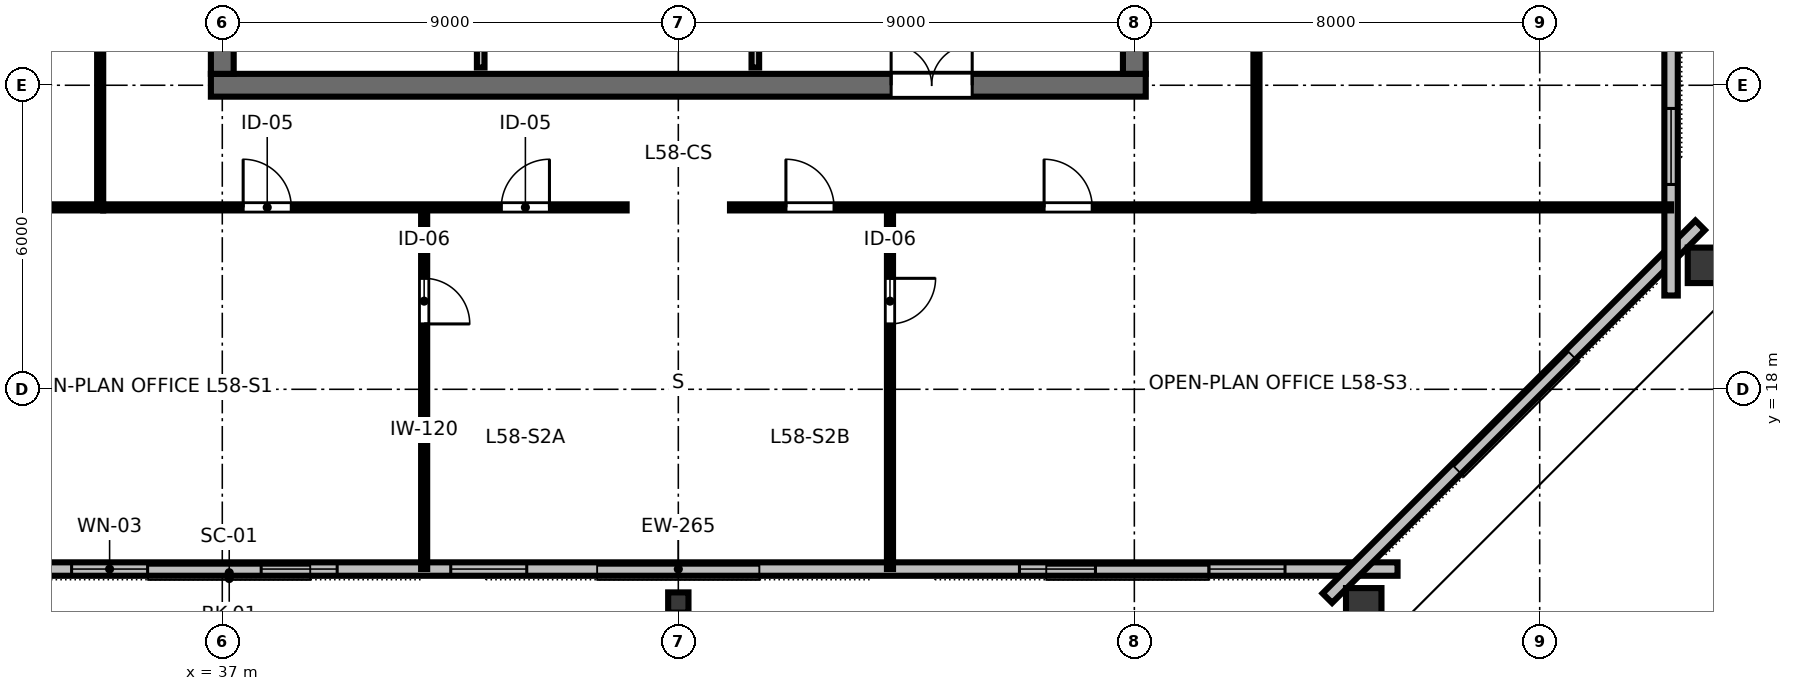
"""IFC4 building model, lengths in metres.
Left out: names, types, materials, properties, quantities, classifications, styles, units other than length and angle.
Written with IfcOpenShell. Run it as: python <this file> out.ifc"""

import sys

from ifc_helpers import new_model, si_unit, direction, frame, frame_2d, origin, origin_2d, place, context, subcontext, project, spatial, rectangle, hollow_rectangle, i_section, extrude, element, fill, save


model = new_model("IFC4")
c1 = context("Model", 3, precision=1e-05, world=origin(), true_north=direction((0.0, 1.0)))
c2 = subcontext(c1, "Body", "Model", "MODEL_VIEW")
j1 = project(units=[si_unit("LENGTHUNIT", "METRE"), si_unit("PLANEANGLEUNIT", "RADIAN")], contexts=[c1])
p1 = place(None, origin())
s1 = spatial("IfcSite", under=j1, at=p1, CompositionType="ELEMENT")
p2 = place(p1, origin())
s2 = spatial("IfcBuilding", under=s1, at=p2, CompositionType="ELEMENT")
p3 = place(p2, frame((0.0, 0.0, 220.2)))
s3 = spatial("IfcBuildingStorey", under=s2, at=p3, CompositionType="ELEMENT", Elevation=220.2)
p4 = place(p3, frame((36.775, 24.0, 0.0), z_axis=(0.0, 0.0, 1.0), x_axis=(1.0, 0.0, 0.0)))
e1 = element("IfcWall", 1, at=p4, inside=s3, PredefinedType="SHEAR", context=c2, shape_type="SweptSolid", body=[
    extrude(rectangle(XDim=18.45, YDim=0.45, at=frame_2d((9.225, 0.0))), origin(), (0.0, 0.0, 1.0), 3.36),
])
p5 = place(p4, frame((13.425, 0.0, 0.0)))
e2 = element("IfcOpeningElement", 2, at=p5, cuts=e1, PredefinedType="OPENING", context=c2, shape_type="SweptSolid", body=[
    extrude(rectangle(XDim=1.6, YDim=2.15, at=frame_2d((0.8, 1.075))), frame((0.0, 0.235, 0.0), z_axis=(0.0, -1.0, 0.0), x_axis=(1.0, 0.0, 0.0)), (0.0, 0.0, 1.0), 0.47),
])
p6 = place(p3, frame((37.0, 24.225, 0.0), z_axis=(0.0, 0.0, 1.0), x_axis=(0.0, 1.0, 0.0)))
e3 = element("IfcWall", 3, at=p6, inside=s3, PredefinedType="SHEAR", context=c2, shape_type="SweptSolid", body=[
    extrude(rectangle(XDim=15.55, YDim=0.45, at=frame_2d((7.775, 0.0))), origin(), (0.0, 0.0, 1.0), 3.36),
])
p7 = place(p6, frame((5.3, 0.0, 0.0)))
e4 = element("IfcOpeningElement", 4, at=p7, cuts=e3, PredefinedType="OPENING", context=c2, shape_type="SweptSolid", body=[
    extrude(rectangle(XDim=1.15, YDim=2.15, at=frame_2d((0.575, 1.075))), frame((0.0, 0.235, 0.0), z_axis=(0.0, -1.0, 0.0), x_axis=(1.0, 0.0, 0.0)), (0.0, 0.0, 1.0), 0.47),
])
p8 = place(p3, frame((55.0, 24.225, 0.0), z_axis=(0.0, 0.0, 1.0), x_axis=(0.0, 1.0, 0.0)))
e5 = element("IfcWall", 5, at=p8, inside=s3, PredefinedType="SHEAR", context=c2, shape_type="SweptSolid", body=[
    extrude(rectangle(XDim=15.55, YDim=0.45, at=frame_2d((7.775, 0.0))), origin(), (0.0, 0.0, 1.0), 3.36),
])
p9 = place(p8, frame((5.3, 0.0, 0.0)))
e6 = element("IfcOpeningElement", 6, at=p9, cuts=e5, PredefinedType="OPENING", context=c2, shape_type="SweptSolid", body=[
    extrude(rectangle(XDim=1.15, YDim=2.15, at=frame_2d((0.575, 1.075))), frame((0.0, 0.235, 0.0), z_axis=(0.0, -1.0, 0.0), x_axis=(1.0, 0.0, 0.0)), (0.0, 0.0, 1.0), 0.47),
])
p10 = place(p3, frame((46.0, 13.793, 0.0), z_axis=(0.0, 0.0, 1.0), x_axis=(1.0, 0.0, 0.0)))
e7 = element("IfcColumn", 7, at=p10, inside=s3, PredefinedType="COLUMN", context=c2, shape_type="SweptSolid", body=[
    extrude(i_section(OverallWidth=0.401, OverallDepth=0.399, WebThickness=0.025, FlangeThickness=0.04, FilletRadius=0.025, at=origin_2d()), origin(), (0.0, 0.0, 1.0), 3.373),
])
for number, where, z_axis, x_axis in (
    (8, (59.527, 13.652, 0.0), (0.0, 0.0, 1.0), (1.0, 0.0, 0.0)),
    (9, (66.347, 20.446, 0.0), (0.0, 0.0, 1.0), (0.0, 1.0, 0.0)),
):
    element("IfcColumn", number, at=place(p3, frame(where, z_axis=z_axis, x_axis=x_axis)), inside=s3, PredefinedType="COLUMN", context=c2, shape_type="SweptSolid", body=[
        extrude(hollow_rectangle(XDim=0.7, YDim=0.85, WallThickness=0.04, at=origin_2d()), origin(), (0.0, 0.0, 1.0), 3.373),
    ])
p11 = place(p3, frame((31.805, 14.453, 0.0), z_axis=(0.0, 0.0, 1.0), x_axis=(1.0, 0.0, 0.0)))
e10 = element("IfcWall", 10, at=p11, inside=s3, PredefinedType="STANDARD", context=c2, shape_type="SweptSolid", body=[
    extrude(rectangle(XDim=28.389, YDim=0.265, at=frame_2d((14.195, 0.0))), origin(), (0.0, 0.0, 1.0), 3.375),
])
p12 = place(p11, frame((2.221, 0.0, 0.85)))
e11 = element("IfcOpeningElement", 11, at=p12, cuts=e10, PredefinedType="OPENING", context=c2, shape_type="SweptSolid", body=[
    extrude(rectangle(XDim=1.5, YDim=1.85, at=frame_2d((0.75, 0.925))), frame((0.0, 0.142, 0.0), z_axis=(0.0, -1.0, 0.0), x_axis=(1.0, 0.0, 0.0)), (0.0, 0.0, 1.0), 0.285),
])
p13 = place(p11, frame((5.962, 0.0, 0.85)))
e12 = element("IfcOpeningElement", 12, at=p13, cuts=e10, PredefinedType="OPENING", context=c2, shape_type="SweptSolid", body=[
    extrude(rectangle(XDim=1.5, YDim=1.85, at=frame_2d((0.75, 0.925))), frame((0.0, 0.142, 0.0), z_axis=(0.0, -1.0, 0.0), x_axis=(1.0, 0.0, 0.0)), (0.0, 0.0, 1.0), 0.285),
])
p14 = place(p11, frame((9.703, 0.0, 0.85)))
e13 = element("IfcOpeningElement", 13, at=p14, cuts=e10, PredefinedType="OPENING", context=c2, shape_type="SweptSolid", body=[
    extrude(rectangle(XDim=1.5, YDim=1.85, at=frame_2d((0.75, 0.925))), frame((0.0, 0.142, 0.0), z_axis=(0.0, -1.0, 0.0), x_axis=(1.0, 0.0, 0.0)), (0.0, 0.0, 1.0), 0.285),
])
p15 = place(p11, frame((20.927, 0.0, 0.85)))
e14 = element("IfcOpeningElement", 14, at=p15, cuts=e10, PredefinedType="OPENING", context=c2, shape_type="SweptSolid", body=[
    extrude(rectangle(XDim=1.5, YDim=1.85, at=frame_2d((0.75, 0.925))), frame((0.0, 0.142, 0.0), z_axis=(0.0, -1.0, 0.0), x_axis=(1.0, 0.0, 0.0)), (0.0, 0.0, 1.0), 0.285),
])
p16 = place(p11, frame((24.668, 0.0, 0.85)))
e15 = element("IfcOpeningElement", 15, at=p16, cuts=e10, PredefinedType="OPENING", context=c2, shape_type="SweptSolid", body=[
    extrude(rectangle(XDim=1.5, YDim=1.85, at=frame_2d((0.75, 0.925))), frame((0.0, 0.142, 0.0), z_axis=(0.0, -1.0, 0.0), x_axis=(1.0, 0.0, 0.0)), (0.0, 0.0, 1.0), 0.285),
])
p17 = place(p3, frame((58.809, 13.879, 0.0), z_axis=(0.0, 0.0, 1.0), x_axis=(0.707106781187, 0.707106781187, 0.0)))
e16 = element("IfcWall", 16, at=p17, inside=s3, PredefinedType="STANDARD", context=c2, shape_type="SweptSolid", body=[
    extrude(rectangle(XDim=10.405, YDim=0.265, at=frame_2d((5.203, 0.0))), origin(), (0.0, 0.0, 1.0), 3.375),
])
p18 = place(p3, frame((65.593, 19.851, 0.0), z_axis=(0.0, 0.0, 1.0), x_axis=(0.0, 1.0, 0.0)))
e17 = element("IfcWall", 17, at=p18, inside=s3, PredefinedType="STANDARD", context=c2, shape_type="SweptSolid", body=[
    extrude(rectangle(XDim=24.298, YDim=0.265, at=frame_2d((12.149, 0.0))), origin(), (0.0, 0.0, 1.0), 3.375),
])
p19 = place(p18, frame((13.499, 0.0, 0.0)))
e18 = element("IfcOpeningElement", 18, at=p19, cuts=e17, PredefinedType="OPENING", context=c2, shape_type="SweptSolid", body=[
    extrude(rectangle(XDim=1.4, YDim=2.15, at=frame_2d((0.7, 1.075))), frame((0.0, 0.142, 0.0), z_axis=(0.0, -1.0, 0.0), x_axis=(1.0, 0.0, 0.0)), (0.0, 0.0, 1.0), 0.285),
])
p20 = place(p18, frame((2.191, 0.0, 0.85)))
e19 = element("IfcOpeningElement", 19, at=p20, cuts=e17, PredefinedType="OPENING", context=c2, shape_type="SweptSolid", body=[
    extrude(rectangle(XDim=1.5, YDim=1.85, at=frame_2d((0.75, 0.925))), frame((0.0, 0.142, 0.0), z_axis=(0.0, -1.0, 0.0), x_axis=(1.0, 0.0, 0.0)), (0.0, 0.0, 1.0), 0.285),
])
p21 = place(p18, frame((5.875, 0.0, 0.85)))
e20 = element("IfcOpeningElement", 20, at=p21, cuts=e17, PredefinedType="OPENING", context=c2, shape_type="SweptSolid", body=[
    extrude(rectangle(XDim=1.5, YDim=1.85, at=frame_2d((0.75, 0.925))), frame((0.0, 0.142, 0.0), z_axis=(0.0, -1.0, 0.0), x_axis=(1.0, 0.0, 0.0)), (0.0, 0.0, 1.0), 0.285),
])
p22 = place(p18, frame((9.558, 0.0, 0.85)))
e21 = element("IfcOpeningElement", 21, at=p22, cuts=e17, PredefinedType="OPENING", context=c2, shape_type="SweptSolid", body=[
    extrude(rectangle(XDim=1.5, YDim=1.85, at=frame_2d((0.75, 0.925))), frame((0.0, 0.142, 0.0), z_axis=(0.0, -1.0, 0.0), x_axis=(1.0, 0.0, 0.0)), (0.0, 0.0, 1.0), 0.285),
])
p23 = place(p18, frame((16.924, 0.0, 0.85)))
e22 = element("IfcOpeningElement", 22, at=p23, cuts=e17, PredefinedType="OPENING", context=c2, shape_type="SweptSolid", body=[
    extrude(rectangle(XDim=1.5, YDim=1.85, at=frame_2d((0.75, 0.925))), frame((0.0, 0.142, 0.0), z_axis=(0.0, -1.0, 0.0), x_axis=(1.0, 0.0, 0.0)), (0.0, 0.0, 1.0), 0.285),
])
p24 = place(p18, frame((20.607, 0.0, 0.85)))
e23 = element("IfcOpeningElement", 23, at=p24, cuts=e17, PredefinedType="OPENING", context=c2, shape_type="SweptSolid", body=[
    extrude(rectangle(XDim=1.5, YDim=1.85, at=frame_2d((0.75, 0.925))), frame((0.0, 0.142, 0.0), z_axis=(0.0, -1.0, 0.0), x_axis=(1.0, 0.0, 0.0)), (0.0, 0.0, 1.0), 0.285),
])
p25 = place(p3, frame((42.1, 24.35, 0.0), z_axis=(0.0, 0.0, 1.0), x_axis=(0.0, 1.0, 0.0)))
e24 = element("IfcWall", 24, at=p25, inside=s3, PredefinedType="PARTITIONING", context=c2, shape_type="SweptSolid", body=[
    extrude(rectangle(XDim=3.9, YDim=0.15, at=frame_2d((1.95, 0.0))), origin(), (0.0, 0.0, 1.0), 3.375),
])
p26 = place(p25, frame((1.5, 0.0, 0.0)))
e25 = element("IfcOpeningElement", 25, at=p26, cuts=e24, PredefinedType="OPENING", context=c2, shape_type="SweptSolid", body=[
    extrude(rectangle(XDim=0.9, YDim=2.15, at=frame_2d((0.45, 1.075))), frame((0.0, 0.085, 0.0), z_axis=(0.0, -1.0, 0.0), x_axis=(1.0, 0.0, 0.0)), (0.0, 0.0, 1.0), 0.17),
])
p27 = place(p3, frame((47.52, 24.35, 0.0), z_axis=(0.0, 0.0, 1.0), x_axis=(0.0, 1.0, 0.0)))
e26 = element("IfcWall", 26, at=p27, inside=s3, PredefinedType="PARTITIONING", context=c2, shape_type="SweptSolid", body=[
    extrude(rectangle(XDim=3.9, YDim=0.15, at=frame_2d((1.95, 0.0))), origin(), (0.0, 0.0, 1.0), 3.375),
])
p28 = place(p27, frame((0.35, 0.0, 0.0)))
e27 = element("IfcOpeningElement", 27, at=p28, cuts=e26, PredefinedType="OPENING", context=c2, shape_type="SweptSolid", body=[
    extrude(rectangle(XDim=0.9, YDim=2.15, at=frame_2d((0.45, 1.075))), frame((0.0, 0.085, 0.0), z_axis=(0.0, -1.0, 0.0), x_axis=(1.0, 0.0, 0.0)), (0.0, 0.0, 1.0), 0.17),
])
p29 = place(p3, frame((40.984, 21.59, 0.0), z_axis=(0.0, 0.0, 1.0), x_axis=(0.0, -1.0, 0.0)))
e28 = element("IfcWall", 28, at=p29, inside=s3, PredefinedType="PARTITIONING", context=c2, shape_type="SweptSolid", body=[
    extrude(rectangle(XDim=7.137, YDim=0.12, at=frame_2d((3.569, 0.0))), origin(), (0.0, 0.0, 1.0), 2.655),
])
p30 = place(p29, frame((1.4, 0.0, 0.0)))
e29 = element("IfcOpeningElement", 29, at=p30, cuts=e28, PredefinedType="OPENING", context=c2, shape_type="SweptSolid", body=[
    extrude(rectangle(XDim=0.9, YDim=2.15, at=frame_2d((0.45, 1.075))), frame((0.0, 0.07, 0.0), z_axis=(0.0, -1.0, 0.0), x_axis=(1.0, 0.0, 0.0)), (0.0, 0.0, 1.0), 0.14),
])
p31 = place(p3, frame((50.177, 21.59, 0.0), z_axis=(0.0, 0.0, 1.0), x_axis=(0.0, -1.0, 0.0)))
e30 = element("IfcWall", 30, at=p31, inside=s3, PredefinedType="PARTITIONING", context=c2, shape_type="SweptSolid", body=[
    extrude(rectangle(XDim=7.137, YDim=0.12, at=frame_2d((3.569, 0.0))), origin(), (0.0, 0.0, 1.0), 2.655),
])
p32 = place(p31, frame((1.4, 0.0, 0.0)))
e31 = element("IfcOpeningElement", 31, at=p32, cuts=e30, PredefinedType="OPENING", context=c2, shape_type="SweptSolid", body=[
    extrude(rectangle(XDim=0.9, YDim=2.15, at=frame_2d((0.45, 1.075))), frame((0.0, 0.07, 0.0), z_axis=(0.0, -1.0, 0.0), x_axis=(1.0, 0.0, 0.0)), (0.0, 0.0, 1.0), 0.14),
])
p33 = place(p3, frame((34.65, 21.59, 0.0), z_axis=(0.0, 0.0, 1.0), x_axis=(1.0, 0.0, 0.0)))
e32 = element("IfcWall", 32, at=p33, inside=s3, PredefinedType="PARTITIONING", context=c2, shape_type="SweptSolid", body=[
    extrude(rectangle(XDim=10.33, YDim=0.12, at=frame_2d((5.165, 0.0))), origin(), (0.0, 0.0, 1.0), 2.655),
])
p34 = place(p33, frame((2.762, 0.0, 0.0)))
e33 = element("IfcOpeningElement", 33, at=p34, cuts=e32, PredefinedType="OPENING", context=c2, shape_type="SweptSolid", body=[
    extrude(rectangle(XDim=0.95, YDim=2.15, at=frame_2d((0.475, 1.075))), frame((0.0, 0.07, 0.0), z_axis=(0.0, -1.0, 0.0), x_axis=(1.0, 0.0, 0.0)), (0.0, 0.0, 1.0), 0.14),
])
p35 = place(p33, frame((7.857, 0.0, 0.0)))
e34 = element("IfcOpeningElement", 34, at=p35, cuts=e32, PredefinedType="OPENING", context=c2, shape_type="SweptSolid", body=[
    extrude(rectangle(XDim=0.95, YDim=2.15, at=frame_2d((0.475, 1.075))), frame((0.0, 0.07, 0.0), z_axis=(0.0, -1.0, 0.0), x_axis=(1.0, 0.0, 0.0)), (0.0, 0.0, 1.0), 0.14),
])
p36 = place(p3, frame((47.02, 21.59, 0.0), z_axis=(0.0, 0.0, 1.0), x_axis=(1.0, 0.0, 0.0)))
e35 = element("IfcWall", 35, at=p36, inside=s3, PredefinedType="PARTITIONING", context=c2, shape_type="SweptSolid", body=[
    extrude(rectangle(XDim=10.33, YDim=0.12, at=frame_2d((5.165, 0.0))), origin(), (0.0, 0.0, 1.0), 2.655),
])
p37 = place(p36, frame((1.104, 0.0, 0.0)))
e36 = element("IfcOpeningElement", 36, at=p37, cuts=e35, PredefinedType="OPENING", context=c2, shape_type="SweptSolid", body=[
    extrude(rectangle(XDim=0.95, YDim=2.15, at=frame_2d((0.475, 1.075))), frame((0.0, 0.07, 0.0), z_axis=(0.0, -1.0, 0.0), x_axis=(1.0, 0.0, 0.0)), (0.0, 0.0, 1.0), 0.14),
])
p38 = place(p36, frame((6.199, 0.0, 0.0)))
e37 = element("IfcOpeningElement", 37, at=p38, cuts=e35, PredefinedType="OPENING", context=c2, shape_type="SweptSolid", body=[
    extrude(rectangle(XDim=0.95, YDim=2.15, at=frame_2d((0.475, 1.075))), frame((0.0, 0.07, 0.0), z_axis=(0.0, -1.0, 0.0), x_axis=(1.0, 0.0, 0.0)), (0.0, 0.0, 1.0), 0.14),
])
p39 = place(p3, frame((34.59, 21.65, 0.0), z_axis=(0.0, 0.0, 1.0), x_axis=(0.0, 1.0, 0.0)))
e38 = element("IfcWall", 38, at=p39, inside=s3, PredefinedType="PARTITIONING", context=c2, shape_type="SweptSolid", body=[
    extrude(rectangle(XDim=20.7, YDim=0.12, at=frame_2d((10.35, 0.0))), origin(), (0.0, 0.0, 1.0), 2.655),
])
p40 = place(p39, frame((5.449, 0.0, 0.0)))
e39 = element("IfcOpeningElement", 39, at=p40, cuts=e38, PredefinedType="OPENING", context=c2, shape_type="SweptSolid", body=[
    extrude(rectangle(XDim=0.95, YDim=2.15, at=frame_2d((0.475, 1.075))), frame((0.0, 0.07, 0.0), z_axis=(0.0, -1.0, 0.0), x_axis=(1.0, 0.0, 0.0)), (0.0, 0.0, 1.0), 0.14),
])
p41 = place(p39, frame((15.599, 0.0, 0.0)))
e40 = element("IfcOpeningElement", 40, at=p41, cuts=e38, PredefinedType="OPENING", context=c2, shape_type="SweptSolid", body=[
    extrude(rectangle(XDim=0.95, YDim=2.15, at=frame_2d((0.475, 1.075))), frame((0.0, 0.07, 0.0), z_axis=(0.0, -1.0, 0.0), x_axis=(1.0, 0.0, 0.0)), (0.0, 0.0, 1.0), 0.14),
])
p42 = place(p3, frame((57.41, 21.65, 0.0), z_axis=(0.0, 0.0, 1.0), x_axis=(0.0, 1.0, 0.0)))
e41 = element("IfcWall", 41, at=p42, inside=s3, PredefinedType="PARTITIONING", context=c2, shape_type="SweptSolid", body=[
    extrude(rectangle(XDim=20.7, YDim=0.12, at=frame_2d((10.35, 0.0))), origin(), (0.0, 0.0, 1.0), 2.655),
])
p43 = place(p42, frame((9.875, 0.0, 0.0)))
e42 = element("IfcOpeningElement", 42, at=p43, cuts=e41, PredefinedType="OPENING", context=c2, shape_type="SweptSolid", body=[
    extrude(rectangle(XDim=0.95, YDim=2.15, at=frame_2d((0.475, 1.075))), frame((0.0, 0.07, 0.0), z_axis=(0.0, -1.0, 0.0), x_axis=(1.0, 0.0, 0.0)), (0.0, 0.0, 1.0), 0.14),
])
for number, where, z_axis, x_axis in (
    (43, (34.65, 21.59, 0.0), (0.0, 0.0, 1.0), (-1.0, 0.0, 0.0)),
    (44, (57.35, 21.59, 0.0), (0.0, 0.0, 1.0), (1.0, 0.0, 0.0)),
):
    element("IfcWall", number, at=place(p3, frame(where, z_axis=z_axis, x_axis=x_axis)), inside=s3, PredefinedType="PARTITIONING", context=c2, shape_type="SweptSolid", body=[
        extrude(rectangle(XDim=8.243, YDim=0.12, at=frame_2d((4.121, 0.0))), origin(), (0.0, 0.0, 1.0), 2.655),
    ])
p44 = place(p12, origin())
e45 = element("IfcWindow", 45, at=p44, inside=s3, PartitioningType="SINGLE_PANEL", PredefinedType="WINDOW", context=c2, shape_type="SweptSolid", body=[
    extrude(rectangle(XDim=1.5, YDim=1.85, at=frame_2d((0.75, 0.925))), frame((0.0, 0.03, 0.0), z_axis=(0.0, -1.0, 0.0), x_axis=(1.0, 0.0, 0.0)), (0.0, 0.0, 1.0), 0.06),
])
fill(e11, e45)
p45 = place(p13, origin())
e46 = element("IfcWindow", 46, at=p45, inside=s3, PartitioningType="SINGLE_PANEL", PredefinedType="WINDOW", context=c2, shape_type="SweptSolid", body=[
    extrude(rectangle(XDim=1.5, YDim=1.85, at=frame_2d((0.75, 0.925))), frame((0.0, 0.03, 0.0), z_axis=(0.0, -1.0, 0.0), x_axis=(1.0, 0.0, 0.0)), (0.0, 0.0, 1.0), 0.06),
])
fill(e12, e46)
p46 = place(p14, origin())
e47 = element("IfcWindow", 47, at=p46, inside=s3, PartitioningType="SINGLE_PANEL", PredefinedType="WINDOW", context=c2, shape_type="SweptSolid", body=[
    extrude(rectangle(XDim=1.5, YDim=1.85, at=frame_2d((0.75, 0.925))), frame((0.0, 0.03, 0.0), z_axis=(0.0, -1.0, 0.0), x_axis=(1.0, 0.0, 0.0)), (0.0, 0.0, 1.0), 0.06),
])
fill(e13, e47)
p47 = place(p15, origin())
e48 = element("IfcWindow", 48, at=p47, inside=s3, PartitioningType="SINGLE_PANEL", PredefinedType="WINDOW", context=c2, shape_type="SweptSolid", body=[
    extrude(rectangle(XDim=1.5, YDim=1.85, at=frame_2d((0.75, 0.925))), frame((0.0, 0.03, 0.0), z_axis=(0.0, -1.0, 0.0), x_axis=(1.0, 0.0, 0.0)), (0.0, 0.0, 1.0), 0.06),
])
fill(e14, e48)
p48 = place(p16, origin())
e49 = element("IfcWindow", 49, at=p48, inside=s3, PartitioningType="SINGLE_PANEL", PredefinedType="WINDOW", context=c2, shape_type="SweptSolid", body=[
    extrude(rectangle(XDim=1.5, YDim=1.85, at=frame_2d((0.75, 0.925))), frame((0.0, 0.03, 0.0), z_axis=(0.0, -1.0, 0.0), x_axis=(1.0, 0.0, 0.0)), (0.0, 0.0, 1.0), 0.06),
])
fill(e15, e49)
p49 = place(p20, origin())
e50 = element("IfcWindow", 50, at=p49, inside=s3, PartitioningType="SINGLE_PANEL", PredefinedType="WINDOW", context=c2, shape_type="SweptSolid", body=[
    extrude(rectangle(XDim=1.5, YDim=1.85, at=frame_2d((0.75, 0.925))), frame((0.0, 0.03, 0.0), z_axis=(0.0, -1.0, 0.0), x_axis=(1.0, 0.0, 0.0)), (0.0, 0.0, 1.0), 0.06),
])
fill(e19, e50)
p50 = place(p5, origin())
e51 = element("IfcDoor", 51, at=p50, inside=s3, OperationType="DOUBLE_DOOR_SINGLE_SWING", PredefinedType="DOOR", context=c2, shape_type="SweptSolid", body=[
    extrude(rectangle(XDim=1.6, YDim=2.15, at=frame_2d((0.8, 1.075))), frame((0.0, 0.025, 0.0), z_axis=(0.0, -1.0, 0.0), x_axis=(1.0, 0.0, 0.0)), (0.0, 0.0, 1.0), 0.05),
])
fill(e2, e51)
p51 = place(p30, origin())
e52 = element("IfcDoor", 52, at=p51, inside=s3, OperationType="SINGLE_SWING_RIGHT", PredefinedType="DOOR", context=c2, shape_type="SweptSolid", body=[
    extrude(rectangle(XDim=0.9, YDim=2.15, at=frame_2d((0.45, 1.075))), frame((0.0, 0.025, 0.0), z_axis=(0.0, -1.0, 0.0), x_axis=(1.0, 0.0, 0.0)), (0.0, 0.0, 1.0), 0.05),
])
fill(e29, e52)
p52 = place(p32, origin())
e53 = element("IfcDoor", 53, at=p52, inside=s3, OperationType="SINGLE_SWING_LEFT", PredefinedType="DOOR", context=c2, shape_type="SweptSolid", body=[
    extrude(rectangle(XDim=0.9, YDim=2.15, at=frame_2d((0.45, 1.075))), frame((0.0, 0.025, 0.0), z_axis=(0.0, -1.0, 0.0), x_axis=(1.0, 0.0, 0.0)), (0.0, 0.0, 1.0), 0.05),
])
fill(e31, e53)
p53 = place(p34, origin())
e54 = element("IfcDoor", 54, at=p53, inside=s3, OperationType="SINGLE_SWING_LEFT", PredefinedType="DOOR", context=c2, shape_type="SweptSolid", body=[
    extrude(rectangle(XDim=0.95, YDim=2.15, at=frame_2d((0.475, 1.075))), frame((0.0, 0.025, 0.0), z_axis=(0.0, -1.0, 0.0), x_axis=(1.0, 0.0, 0.0)), (0.0, 0.0, 1.0), 0.05),
])
fill(e33, e54)
p54 = place(p35, origin())
e55 = element("IfcDoor", 55, at=p54, inside=s3, OperationType="SINGLE_SWING_RIGHT", PredefinedType="DOOR", context=c2, shape_type="SweptSolid", body=[
    extrude(rectangle(XDim=0.95, YDim=2.15, at=frame_2d((0.475, 1.075))), frame((0.0, 0.025, 0.0), z_axis=(0.0, -1.0, 0.0), x_axis=(1.0, 0.0, 0.0)), (0.0, 0.0, 1.0), 0.05),
])
fill(e34, e55)
p55 = place(p37, origin())
e56 = element("IfcDoor", 56, at=p55, inside=s3, OperationType="SINGLE_SWING_LEFT", PredefinedType="DOOR", context=c2, shape_type="SweptSolid", body=[
    extrude(rectangle(XDim=0.95, YDim=2.15, at=frame_2d((0.475, 1.075))), frame((0.0, 0.025, 0.0), z_axis=(0.0, -1.0, 0.0), x_axis=(1.0, 0.0, 0.0)), (0.0, 0.0, 1.0), 0.05),
])
fill(e36, e56)
p56 = place(p38, origin())
e57 = element("IfcDoor", 57, at=p56, inside=s3, OperationType="SINGLE_SWING_LEFT", PredefinedType="DOOR", context=c2, shape_type="SweptSolid", body=[
    extrude(rectangle(XDim=0.95, YDim=2.15, at=frame_2d((0.475, 1.075))), frame((0.0, 0.025, 0.0), z_axis=(0.0, -1.0, 0.0), x_axis=(1.0, 0.0, 0.0)), (0.0, 0.0, 1.0), 0.05),
])
fill(e37, e57)
save(model, sys.argv[1])
